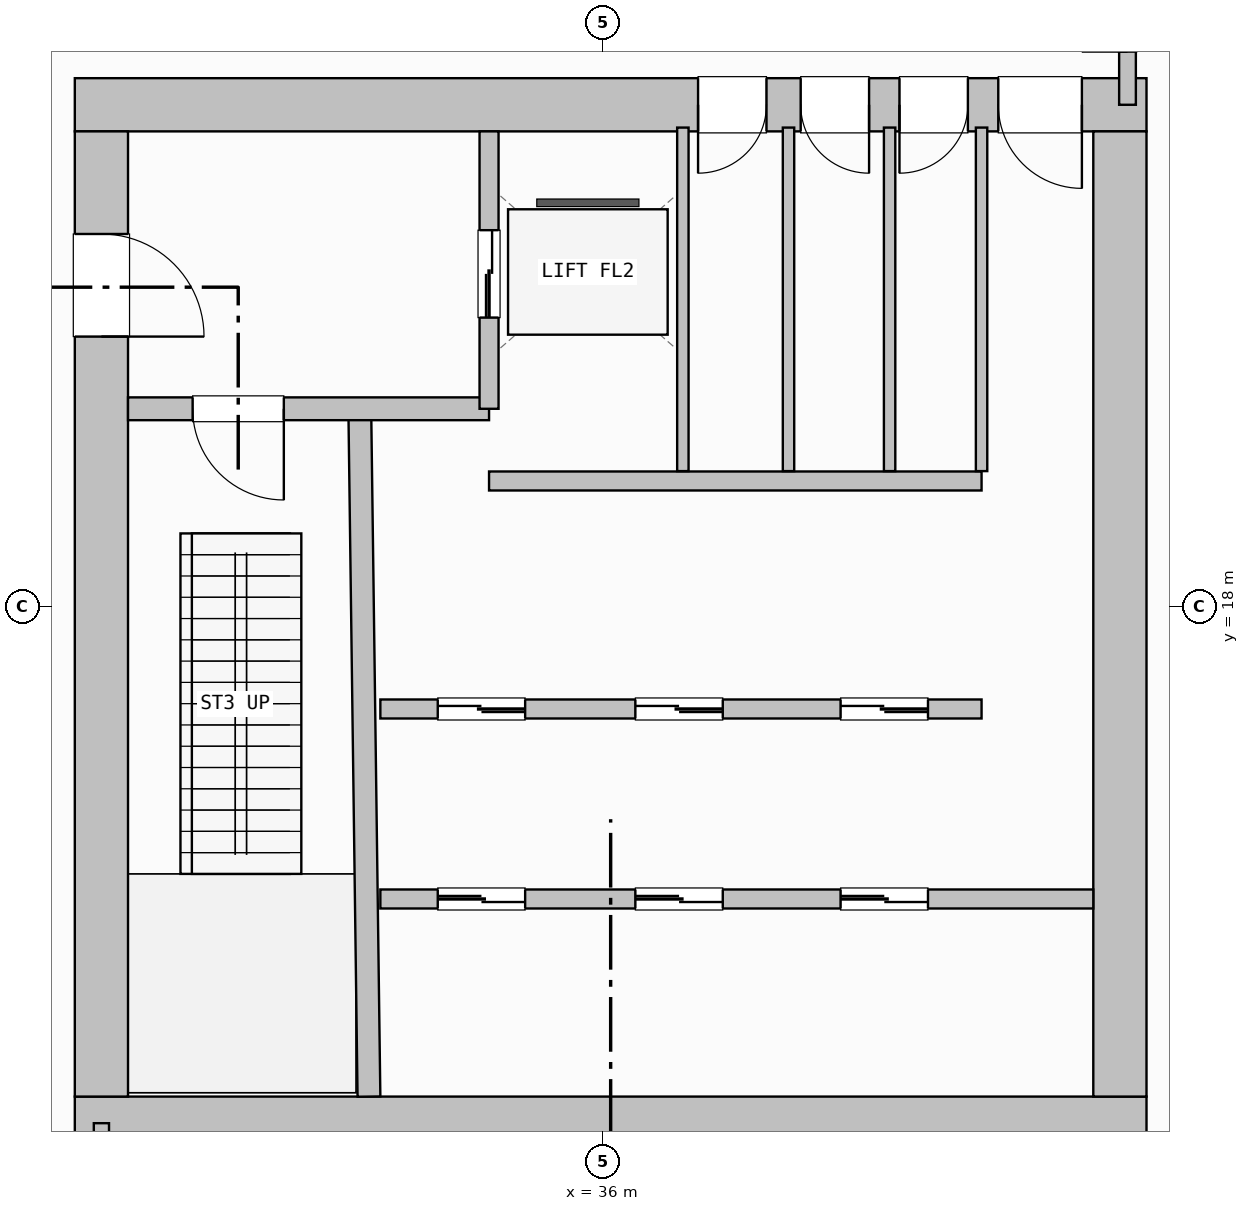
"""IFC4 building model, lengths in metres.
Left out: names, types, materials, properties, quantities, classifications, styles, units other than length and angle.
Written with IfcOpenShell. Run it as: python <this file> out.ifc"""

import sys

from ifc_helpers import new_model, si_unit, direction, frame, frame_2d, origin, place, context, subcontext, project, spatial, rectangle, extrude, element, fill, save


model = new_model("IFC4")
c1 = context("Model", 3, precision=1e-05, world=origin(), true_north=direction((0.0, 1.0)))
c2 = subcontext(c1, "Body", "Model", "MODEL_VIEW")
j1 = project(units=[si_unit("LENGTHUNIT", "METRE"), si_unit("PLANEANGLEUNIT", "RADIAN")], contexts=[c1])
p1 = place(None, origin())
s1 = spatial("IfcSite", under=j1, at=p1, CompositionType="ELEMENT")
p2 = place(p1, origin())
s2 = spatial("IfcBuilding", under=s1, at=p2, CompositionType="ELEMENT")
p3 = place(p2, origin())
s3 = spatial("IfcBuildingStorey", under=s2, at=p3, CompositionType="ELEMENT", Elevation=0.0)
p4 = place(p3, frame((43.15, 11.2, 0.0), z_axis=(0.0, 0.0, 1.0), x_axis=(-1.0, 0.0, 0.0)))
e1 = element("IfcWall", 1, at=p4, inside=s3, PredefinedType="SHEAR", context=c2, shape_type="SweptSolid", body=[
    extrude(rectangle(XDim=14.1, YDim=0.7, at=frame_2d((7.05, 0.0))), origin(), (0.0, 0.0, 1.0), 5.48),
])
p5 = place(p3, frame((43.15, 24.6, 0.0), z_axis=(0.0, 0.0, 1.0), x_axis=(-1.0, 0.0, 0.0)))
e2 = element("IfcWall", 2, at=p5, inside=s3, PredefinedType="SHEAR", context=c2, shape_type="SweptSolid", body=[
    extrude(rectangle(XDim=14.1, YDim=0.7, at=frame_2d((7.05, 0.0))), origin(), (0.0, 0.0, 1.0), 5.48),
])
p6 = place(p5, frame((0.85, 0.0, 0.0)))
e3 = element("IfcOpeningElement", 3, at=p6, cuts=e2, PredefinedType="OPENING", context=c2, shape_type="SweptSolid", body=[
    extrude(rectangle(XDim=1.1, YDim=2.15, at=frame_2d((0.55, 1.075))), frame((0.0, 0.36, 0.0), z_axis=(0.0, -1.0, 0.0), x_axis=(1.0, 0.0, 0.0)), (0.0, 0.0, 1.0), 0.72),
])
p7 = place(p5, frame((2.35, 0.0, 0.0)))
e4 = element("IfcOpeningElement", 4, at=p7, cuts=e2, PredefinedType="OPENING", context=c2, shape_type="SweptSolid", body=[
    extrude(rectangle(XDim=0.9, YDim=2.1, at=frame_2d((0.45, 1.05))), frame((0.0, 0.36, 0.0), z_axis=(0.0, -1.0, 0.0), x_axis=(1.0, 0.0, 0.0)), (0.0, 0.0, 1.0), 0.72),
])
p8 = place(p5, frame((3.65, 0.0, 0.0)))
e5 = element("IfcOpeningElement", 5, at=p8, cuts=e2, PredefinedType="OPENING", context=c2, shape_type="SweptSolid", body=[
    extrude(rectangle(XDim=0.9, YDim=2.1, at=frame_2d((0.45, 1.05))), frame((0.0, 0.36, 0.0), z_axis=(0.0, -1.0, 0.0), x_axis=(1.0, 0.0, 0.0)), (0.0, 0.0, 1.0), 0.72),
])
p9 = place(p5, frame((5.0, 0.0, 0.0)))
e6 = element("IfcOpeningElement", 6, at=p9, cuts=e2, PredefinedType="OPENING", context=c2, shape_type="SweptSolid", body=[
    extrude(rectangle(XDim=0.9, YDim=2.1, at=frame_2d((0.45, 1.05))), frame((0.0, 0.36, 0.0), z_axis=(0.0, -1.0, 0.0), x_axis=(1.0, 0.0, 0.0)), (0.0, 0.0, 1.0), 0.72),
])
p10 = place(p3, frame((29.4, 24.25, 0.0), z_axis=(0.0, 0.0, 1.0), x_axis=(0.0, -1.0, 0.0)))
e7 = element("IfcWall", 7, at=p10, inside=s3, PredefinedType="SHEAR", context=c2, shape_type="SweptSolid", body=[
    extrude(rectangle(XDim=12.7, YDim=0.7, at=frame_2d((6.35, 0.0))), origin(), (0.0, 0.0, 1.0), 5.48),
])
p11 = place(p10, frame((1.35, 0.0, 0.0)))
e8 = element("IfcOpeningElement", 8, at=p11, cuts=e7, PredefinedType="OPENING", context=c2, shape_type="SweptSolid", body=[
    extrude(rectangle(XDim=1.35, YDim=2.15, at=frame_2d((0.675, 1.075))), frame((0.0, 0.36, 0.0), z_axis=(0.0, -1.0, 0.0), x_axis=(1.0, 0.0, 0.0)), (0.0, 0.0, 1.0), 0.72),
])
p12 = place(p3, frame((42.8, 11.55, 0.0), z_axis=(0.0, 0.0, 1.0), x_axis=(0.0, 1.0, 0.0)))
e9 = element("IfcWall", 9, at=p12, inside=s3, PredefinedType="SHEAR", context=c2, shape_type="SweptSolid", body=[
    extrude(rectangle(XDim=12.7, YDim=0.7, at=frame_2d((6.35, 0.0))), origin(), (0.0, 0.0, 1.0), 5.48),
])
p13 = place(p3, frame((32.92, 11.55, 0.0), z_axis=(0.0, 0.0, 1.0), x_axis=(-0.01331804616, 0.99991131089, 0.0)))
e10 = element("IfcWall", 10, at=p13, inside=s3, PredefinedType="SHEAR", context=c2, shape_type="SweptSolid", body=[
    extrude(rectangle(XDim=9.001, YDim=0.3, at=frame_2d((4.5, 0.0))), origin(), (0.0, 0.0, 1.0), 5.48),
])
p14 = place(p3, frame((34.5, 20.6, 0.0), z_axis=(0.0, 0.0, 1.0), x_axis=(-1.0, 0.0, 0.0)))
e11 = element("IfcWall", 11, at=p14, inside=s3, PredefinedType="SHEAR", context=c2, shape_type="SweptSolid", body=[
    extrude(rectangle(XDim=4.75, YDim=0.3, at=frame_2d((2.375, 0.0))), origin(), (0.0, 0.0, 1.0), 5.48),
])
p15 = place(p14, frame((2.7, 0.0, 0.0)))
e12 = element("IfcOpeningElement", 12, at=p15, cuts=e11, PredefinedType="OPENING", context=c2, shape_type="SweptSolid", body=[
    extrude(rectangle(XDim=1.2, YDim=2.15, at=frame_2d((0.6, 1.075))), frame((0.0, 0.16, 0.0), z_axis=(0.0, -1.0, 0.0), x_axis=(1.0, 0.0, 0.0)), (0.0, 0.0, 1.0), 0.32),
])
p16 = place(p3, frame((34.5, 20.6, 0.0), z_axis=(0.0, 0.0, 1.0), x_axis=(0.0, 1.0, 0.0)))
e13 = element("IfcWall", 13, at=p16, inside=s3, PredefinedType="PARTITIONING", context=c2, shape_type="SweptSolid", body=[
    extrude(rectangle(XDim=3.65, YDim=0.25, at=frame_2d((1.825, 0.0))), origin(), (0.0, 0.0, 1.0), 5.48),
])
p17 = place(p16, frame((1.2, 0.0, 0.0)))
e14 = element("IfcOpeningElement", 14, at=p17, cuts=e13, PredefinedType="OPENING", context=c2, shape_type="SweptSolid", body=[
    extrude(rectangle(XDim=1.15, YDim=2.15, at=frame_2d((0.575, 1.075))), frame((0.0, 0.135, 0.0), z_axis=(0.0, -1.0, 0.0), x_axis=(1.0, 0.0, 0.0)), (0.0, 0.0, 1.0), 0.27),
])
p18 = place(p3, frame((34.5, 19.65, 0.0), z_axis=(0.0, 0.0, 1.0), x_axis=(1.0, 0.0, 0.0)))
e15 = element("IfcWall", 15, at=p18, inside=s3, PredefinedType="PARTITIONING", context=c2, shape_type="SweptSolid", body=[
    extrude(rectangle(XDim=6.48, YDim=0.25, at=frame_2d((3.24, 0.0))), origin(), (0.0, 0.0, 1.0), 5.48),
])
p19 = place(p3, frame((33.07, 14.15, 0.0), z_axis=(0.0, 0.0, 1.0), x_axis=(1.0, 0.0, 0.0)))
e16 = element("IfcWall", 16, at=p19, inside=s3, PredefinedType="PARTITIONING", context=c2, shape_type="SweptSolid", body=[
    extrude(rectangle(XDim=9.38, YDim=0.25, at=frame_2d((4.69, 0.0))), origin(), (0.0, 0.0, 1.0), 5.48),
])
p20 = place(p19, frame((0.755, 0.0, 0.0)))
e17 = element("IfcOpeningElement", 17, at=p20, cuts=e16, PredefinedType="OPENING", context=c2, shape_type="SweptSolid", body=[
    extrude(rectangle(XDim=1.15, YDim=2.15, at=frame_2d((0.575, 1.075))), frame((0.0, 0.135, 0.0), z_axis=(0.0, -1.0, 0.0), x_axis=(1.0, 0.0, 0.0)), (0.0, 0.0, 1.0), 0.27),
])
p21 = place(p19, frame((3.355, 0.0, 0.0)))
e18 = element("IfcOpeningElement", 18, at=p21, cuts=e16, PredefinedType="OPENING", context=c2, shape_type="SweptSolid", body=[
    extrude(rectangle(XDim=1.15, YDim=2.15, at=frame_2d((0.575, 1.075))), frame((0.0, 0.135, 0.0), z_axis=(0.0, -1.0, 0.0), x_axis=(1.0, 0.0, 0.0)), (0.0, 0.0, 1.0), 0.27),
])
p22 = place(p19, frame((6.055, 0.0, 0.0)))
e19 = element("IfcOpeningElement", 19, at=p22, cuts=e16, PredefinedType="OPENING", context=c2, shape_type="SweptSolid", body=[
    extrude(rectangle(XDim=1.15, YDim=2.15, at=frame_2d((0.575, 1.075))), frame((0.0, 0.135, 0.0), z_axis=(0.0, -1.0, 0.0), x_axis=(1.0, 0.0, 0.0)), (0.0, 0.0, 1.0), 0.27),
])
p23 = place(p3, frame((40.98, 16.65, 0.0), z_axis=(0.0, 0.0, 1.0), x_axis=(-1.0, 0.0, 0.0)))
e20 = element("IfcWall", 20, at=p23, inside=s3, PredefinedType="PARTITIONING", context=c2, shape_type="SweptSolid", body=[
    extrude(rectangle(XDim=7.91, YDim=0.25, at=frame_2d((3.955, 0.0))), origin(), (0.0, 0.0, 1.0), 5.48),
])
p24 = place(p23, frame((6.005, 0.0, 0.0)))
e21 = element("IfcOpeningElement", 21, at=p24, cuts=e20, PredefinedType="OPENING", context=c2, shape_type="SweptSolid", body=[
    extrude(rectangle(XDim=1.15, YDim=2.15, at=frame_2d((0.575, 1.075))), frame((0.0, 0.135, 0.0), z_axis=(0.0, -1.0, 0.0), x_axis=(1.0, 0.0, 0.0)), (0.0, 0.0, 1.0), 0.27),
])
p25 = place(p23, frame((3.405, 0.0, 0.0)))
e22 = element("IfcOpeningElement", 22, at=p25, cuts=e20, PredefinedType="OPENING", context=c2, shape_type="SweptSolid", body=[
    extrude(rectangle(XDim=1.15, YDim=2.15, at=frame_2d((0.575, 1.075))), frame((0.0, 0.135, 0.0), z_axis=(0.0, -1.0, 0.0), x_axis=(1.0, 0.0, 0.0)), (0.0, 0.0, 1.0), 0.27),
])
p26 = place(p23, frame((0.705, 0.0, 0.0)))
e23 = element("IfcOpeningElement", 23, at=p26, cuts=e20, PredefinedType="OPENING", context=c2, shape_type="SweptSolid", body=[
    extrude(rectangle(XDim=1.15, YDim=2.15, at=frame_2d((0.575, 1.075))), frame((0.0, 0.135, 0.0), z_axis=(0.0, -1.0, 0.0), x_axis=(1.0, 0.0, 0.0)), (0.0, 0.0, 1.0), 0.27),
])
for number, where, z_axis, x_axis in (
    (24, (37.05, 19.78, 0.0), (0.0, 0.0, 1.0), (0.0, 1.0, 0.0)),
    (25, (38.44, 19.78, 0.0), (0.0, 0.0, 1.0), (0.0, 1.0, 0.0)),
    (26, (39.77, 19.78, 0.0), (0.0, 0.0, 1.0), (0.0, 1.0, 0.0)),
    (27, (40.98, 19.78, 0.0), (0.0, 0.0, 1.0), (0.0, 1.0, 0.0)),
):
    element("IfcWall", number, at=place(p3, frame(where, z_axis=z_axis, x_axis=x_axis)), inside=s3, PredefinedType="PARTITIONING", context=c2, shape_type="SweptSolid", body=[
        extrude(rectangle(XDim=4.52, YDim=0.15, at=frame_2d((2.26, 0.0))), origin(), (0.0, 0.0, 1.0), 5.48),
    ])
p27 = place(p3, frame((29.4, 5.1, 0.0), z_axis=(0.0, 0.0, 1.0), x_axis=(0.0, 1.0, 0.0)))
e28 = element("IfcWall", 28, at=p27, inside=s3, PredefinedType="PARTITIONING", context=c2, shape_type="SweptSolid", body=[
    extrude(rectangle(XDim=6.1, YDim=0.2, at=frame_2d((3.05, 0.0))), origin(), (0.0, 0.0, 1.0), 4.533),
])
p28 = place(p27, frame((2.0, 0.0, 0.0)))
e29 = element("IfcOpeningElement", 29, at=p28, cuts=e28, PredefinedType="OPENING", context=c2, shape_type="SweptSolid", body=[
    extrude(rectangle(XDim=1.2, YDim=2.15, at=frame_2d((0.6, 1.075))), frame((0.0, 0.11, 0.0), z_axis=(0.0, -1.0, 0.0), x_axis=(1.0, 0.0, 0.0)), (0.0, 0.0, 1.0), 0.22),
])
p29 = place(p3, frame((42.9, 24.6, 0.0), z_axis=(0.0, 0.0, 1.0), x_axis=(0.0, 1.0, 0.0)))
e30 = element("IfcWall", 30, at=p29, inside=s3, PredefinedType="PARTITIONING", context=c2, shape_type="SweptSolid", body=[
    extrude(rectangle(XDim=29.4, YDim=0.22, at=frame_2d((14.7, 0.0))), origin(), (0.0, 0.0, 1.0), 4.533),
])
p30 = place(p29, frame((0.7, 0.0, 0.0)))
e31 = element("IfcOpeningElement", 31, at=p30, cuts=e30, PredefinedType="OPENING", context=c2, shape_type="SweptSolid", body=[
    extrude(rectangle(XDim=1.2, YDim=2.15, at=frame_2d((0.6, 1.075))), frame((0.0, 0.12, 0.0), z_axis=(0.0, -1.0, 0.0), x_axis=(1.0, 0.0, 0.0)), (0.0, 0.0, 1.0), 0.24),
])
p31 = place(p15, origin())
e32 = element("IfcDoor", 32, at=p31, inside=s3, OperationType="SINGLE_SWING_LEFT", PredefinedType="DOOR", context=c2, shape_type="SweptSolid", body=[
    extrude(rectangle(XDim=1.2, YDim=2.15, at=frame_2d((0.6, 1.075))), frame((0.0, 0.025, 0.0), z_axis=(0.0, -1.0, 0.0), x_axis=(1.0, 0.0, 0.0)), (0.0, 0.0, 1.0), 0.05),
])
fill(e12, e32)
p32 = place(p11, origin())
e33 = element("IfcDoor", 33, at=p32, inside=s3, OperationType="SINGLE_SWING_RIGHT", PredefinedType="DOOR", context=c2, shape_type="SweptSolid", body=[
    extrude(rectangle(XDim=1.35, YDim=2.15, at=frame_2d((0.675, 1.075))), frame((0.0, 0.025, 0.0), z_axis=(0.0, -1.0, 0.0), x_axis=(1.0, 0.0, 0.0)), (0.0, 0.0, 1.0), 0.05),
])
fill(e8, e33)
p33 = place(p6, origin())
e34 = element("IfcDoor", 34, at=p33, inside=s3, OperationType="SINGLE_SWING_LEFT", PredefinedType="DOOR", context=c2, shape_type="SweptSolid", body=[
    extrude(rectangle(XDim=1.1, YDim=2.15, at=frame_2d((0.55, 1.075))), frame((0.0, 0.025, 0.0), z_axis=(0.0, -1.0, 0.0), x_axis=(1.0, 0.0, 0.0)), (0.0, 0.0, 1.0), 0.05),
])
fill(e3, e34)
p34 = place(p7, origin())
e35 = element("IfcDoor", 35, at=p34, inside=s3, OperationType="SINGLE_SWING_RIGHT", PredefinedType="DOOR", context=c2, shape_type="SweptSolid", body=[
    extrude(rectangle(XDim=0.9, YDim=2.1, at=frame_2d((0.45, 1.05))), frame((0.0, 0.025, 0.0), z_axis=(0.0, -1.0, 0.0), x_axis=(1.0, 0.0, 0.0)), (0.0, 0.0, 1.0), 0.05),
])
fill(e4, e35)
p35 = place(p8, origin())
e36 = element("IfcDoor", 36, at=p35, inside=s3, OperationType="SINGLE_SWING_LEFT", PredefinedType="DOOR", context=c2, shape_type="SweptSolid", body=[
    extrude(rectangle(XDim=0.9, YDim=2.1, at=frame_2d((0.45, 1.05))), frame((0.0, 0.025, 0.0), z_axis=(0.0, -1.0, 0.0), x_axis=(1.0, 0.0, 0.0)), (0.0, 0.0, 1.0), 0.05),
])
fill(e5, e36)
p36 = place(p9, origin())
e37 = element("IfcDoor", 37, at=p36, inside=s3, OperationType="SINGLE_SWING_RIGHT", PredefinedType="DOOR", context=c2, shape_type="SweptSolid", body=[
    extrude(rectangle(XDim=0.9, YDim=2.1, at=frame_2d((0.45, 1.05))), frame((0.0, 0.025, 0.0), z_axis=(0.0, -1.0, 0.0), x_axis=(1.0, 0.0, 0.0)), (0.0, 0.0, 1.0), 0.05),
])
fill(e6, e37)
p37 = place(p17, origin())
e38 = element("IfcDoor", 38, at=p37, inside=s3, OperationType="DOUBLE_DOOR_SLIDING", PredefinedType="DOOR", context=c2, shape_type="SweptSolid", body=[
    extrude(rectangle(XDim=1.15, YDim=2.15, at=frame_2d((0.575, 1.075))), frame((0.0, 0.025, 0.0), z_axis=(0.0, -1.0, 0.0), x_axis=(1.0, 0.0, 0.0)), (0.0, 0.0, 1.0), 0.05),
])
fill(e14, e38)
p38 = place(p20, origin())
e39 = element("IfcDoor", 39, at=p38, inside=s3, OperationType="DOUBLE_DOOR_SLIDING", PredefinedType="DOOR", context=c2, shape_type="SweptSolid", body=[
    extrude(rectangle(XDim=1.15, YDim=2.15, at=frame_2d((0.575, 1.075))), frame((0.0, 0.025, 0.0), z_axis=(0.0, -1.0, 0.0), x_axis=(1.0, 0.0, 0.0)), (0.0, 0.0, 1.0), 0.05),
])
fill(e17, e39)
p39 = place(p21, origin())
e40 = element("IfcDoor", 40, at=p39, inside=s3, OperationType="DOUBLE_DOOR_SLIDING", PredefinedType="DOOR", context=c2, shape_type="SweptSolid", body=[
    extrude(rectangle(XDim=1.15, YDim=2.15, at=frame_2d((0.575, 1.075))), frame((0.0, 0.025, 0.0), z_axis=(0.0, -1.0, 0.0), x_axis=(1.0, 0.0, 0.0)), (0.0, 0.0, 1.0), 0.05),
])
fill(e18, e40)
p40 = place(p24, origin())
e41 = element("IfcDoor", 41, at=p40, inside=s3, OperationType="DOUBLE_DOOR_SLIDING", PredefinedType="DOOR", context=c2, shape_type="SweptSolid", body=[
    extrude(rectangle(XDim=1.15, YDim=2.15, at=frame_2d((0.575, 1.075))), frame((0.0, 0.025, 0.0), z_axis=(0.0, -1.0, 0.0), x_axis=(1.0, 0.0, 0.0)), (0.0, 0.0, 1.0), 0.05),
])
fill(e21, e41)
p41 = place(p25, origin())
e42 = element("IfcDoor", 42, at=p41, inside=s3, OperationType="DOUBLE_DOOR_SLIDING", PredefinedType="DOOR", context=c2, shape_type="SweptSolid", body=[
    extrude(rectangle(XDim=1.15, YDim=2.15, at=frame_2d((0.575, 1.075))), frame((0.0, 0.025, 0.0), z_axis=(0.0, -1.0, 0.0), x_axis=(1.0, 0.0, 0.0)), (0.0, 0.0, 1.0), 0.05),
])
fill(e22, e42)
p42 = place(p22, origin())
e43 = element("IfcDoor", 43, at=p42, inside=s3, OperationType="DOUBLE_DOOR_SLIDING", PredefinedType="DOOR", context=c2, shape_type="SweptSolid", body=[
    extrude(rectangle(XDim=1.15, YDim=2.15, at=frame_2d((0.575, 1.075))), frame((0.0, 0.025, 0.0), z_axis=(0.0, -1.0, 0.0), x_axis=(1.0, 0.0, 0.0)), (0.0, 0.0, 1.0), 0.05),
])
fill(e19, e43)
p43 = place(p26, origin())
e44 = element("IfcDoor", 44, at=p43, inside=s3, OperationType="DOUBLE_DOOR_SLIDING", PredefinedType="DOOR", context=c2, shape_type="SweptSolid", body=[
    extrude(rectangle(XDim=1.15, YDim=2.15, at=frame_2d((0.575, 1.075))), frame((0.0, 0.025, 0.0), z_axis=(0.0, -1.0, 0.0), x_axis=(1.0, 0.0, 0.0)), (0.0, 0.0, 1.0), 0.05),
])
fill(e23, e44)
save(model, sys.argv[1])
